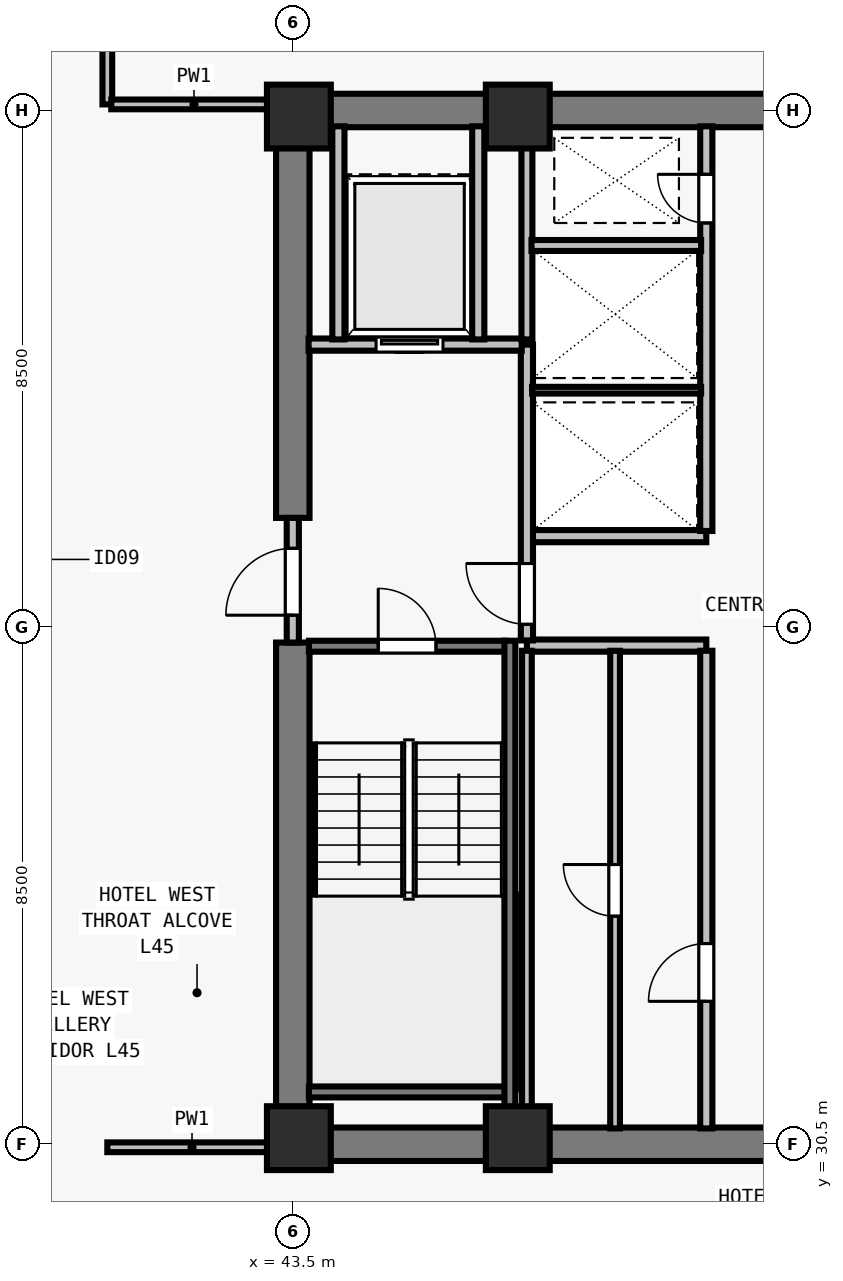
"""IFC4 building model, lengths in metres.
Left out: names, types, materials, properties, quantities, classifications, styles, units other than length and angle.
Written with IfcOpenShell. Run it as: python <this file> out.ifc"""

import sys

from ifc_helpers import new_model, si_unit, direction, frame, frame_2d, origin, origin_2d, place, context, subcontext, project, spatial, rectangle, extrude, element, fill, save


model = new_model("IFC4")
c1 = context("Model", 3, precision=1e-05, world=origin(), true_north=direction((0.0, 1.0)))
c2 = subcontext(c1, "Body", "Model", "MODEL_VIEW")
j1 = project(units=[si_unit("LENGTHUNIT", "METRE"), si_unit("PLANEANGLEUNIT", "RADIAN")], contexts=[c1])
p1 = place(None, origin())
s1 = spatial("IfcSite", under=j1, at=p1, CompositionType="ELEMENT")
p2 = place(p1, origin())
s2 = spatial("IfcBuilding", under=s1, at=p2, CompositionType="ELEMENT")
p3 = place(p2, frame((0.0, 0.0, 165.5)))
s3 = spatial("IfcBuildingStorey", under=s2, at=p3, CompositionType="ELEMENT", Elevation=165.5)
for number, where, z_axis, x_axis in (
    (1, (43.6, 30.6, 0.0), (0.0, 0.0, 1.0), (1.0, 0.0, 0.0)),
    (2, (47.2, 30.6, 0.0), (0.0, 0.0, 1.0), (1.0, 0.0, 0.0)),
    (3, (43.6, 47.4, 0.0), (0.0, 0.0, 1.0), (1.0, 0.0, 0.0)),
    (4, (47.2, 47.4, 0.0), (0.0, 0.0, 1.0), (1.0, 0.0, 0.0)),
):
    element("IfcColumn", number, at=place(p3, frame(where, z_axis=z_axis, x_axis=x_axis)), inside=s3, PredefinedType="COLUMN", context=c2, shape_type="SweptSolid", body=[
        extrude(rectangle(XDim=1.05, YDim=1.05, at=origin_2d()), origin(), (0.0, 0.0, 1.0), 3.5),
    ])
for number, where, z_axis, x_axis in (
    (5, (43.225, 30.5, 0.0), (0.0, 0.0, 1.0), (1.0, 0.0, 0.0)),
    (6, (43.225, 47.5, 0.0), (0.0, 0.0, 1.0), (1.0, 0.0, 0.0)),
):
    element("IfcWall", number, at=place(p3, frame(where, z_axis=z_axis, x_axis=x_axis)), inside=s3, PredefinedType="SHEAR", context=c2, shape_type="SweptSolid", body=[
        extrude(rectangle(XDim=17.55, YDim=0.55, at=frame_2d((8.775, 0.0))), origin(), (0.0, 0.0, 1.0), 3.28),
    ])
p4 = place(p3, frame((43.5, 30.765, 0.0), z_axis=(0.0, 0.0, 1.0), x_axis=(0.0, 1.0, 0.0)))
e7 = element("IfcWall", 7, at=p4, inside=s3, PredefinedType="SHEAR", context=c2, shape_type="SweptSolid", body=[
    extrude(rectangle(XDim=7.985, YDim=0.55, at=frame_2d((3.993, 0.0))), origin(), (0.0, 0.0, 1.0), 3.28),
])
p5 = place(p3, frame((43.5, 40.8, 0.0), z_axis=(0.0, 0.0, 1.0), x_axis=(0.0, 1.0, 0.0)))
e8 = element("IfcWall", 8, at=p5, inside=s3, PredefinedType="SHEAR", context=c2, shape_type="SweptSolid", body=[
    extrude(rectangle(XDim=6.435, YDim=0.55, at=frame_2d((3.218, 0.0))), origin(), (0.0, 0.0, 1.0), 3.28),
])
for number, where, z_axis, x_axis in (
    (9, (47.35, 38.7, 0.0), (0.0, 0.0, 1.0), (1.0, 0.0, 0.0)),
    (10, (47.35, 40.5, 0.0), (0.0, 0.0, 1.0), (1.0, 0.0, 0.0)),
):
    element("IfcWall", number, at=place(p3, frame(where, z_axis=z_axis, x_axis=x_axis)), inside=s3, PredefinedType="SOLIDWALL", context=c2, shape_type="SweptSolid", body=[
        extrude(rectangle(XDim=2.95, YDim=0.2, at=frame_2d((1.475, 0.0))), origin(), (0.0, 0.0, 1.0), 3.28),
    ])
p6 = place(p3, frame((50.3, 30.76, 0.0), z_axis=(0.0, 0.0, 1.0), x_axis=(0.0, 1.0, 0.0)))
e11 = element("IfcWall", 11, at=p6, inside=s3, PredefinedType="SOLIDWALL", context=c2, shape_type="SweptSolid", body=[
    extrude(rectangle(XDim=7.855, YDim=0.2, at=frame_2d((3.927, 0.0))), origin(), (0.0, 0.0, 1.0), 3.28),
])
p7 = place(p6, frame((2.09, 0.0, 0.0)))
e12 = element("IfcOpeningElement", 12, at=p7, cuts=e11, PredefinedType="OPENING", context=c2, shape_type="SweptSolid", body=[
    extrude(rectangle(XDim=0.95, YDim=2.12, at=frame_2d((0.475, 1.06))), frame((0.0, 0.11, 0.0), z_axis=(0.0, -1.0, 0.0), x_axis=(1.0, 0.0, 0.0)), (0.0, 0.0, 1.0), 0.22),
])
p8 = place(p3, frame((50.3, 40.585, 0.0), z_axis=(0.0, 0.0, 1.0), x_axis=(0.0, 1.0, 0.0)))
e13 = element("IfcWall", 13, at=p8, inside=s3, PredefinedType="SOLIDWALL", context=c2, shape_type="SweptSolid", body=[
    extrude(rectangle(XDim=6.655, YDim=0.2, at=frame_2d((3.328, 0.0))), origin(), (0.0, 0.0, 1.0), 3.28),
])
p9 = place(p8, frame((5.065, 0.0, 0.0)))
e14 = element("IfcOpeningElement", 14, at=p9, cuts=e13, PredefinedType="OPENING", context=c2, shape_type="SweptSolid", body=[
    extrude(rectangle(XDim=0.8, YDim=2.08, at=frame_2d((0.4, 1.04))), frame((0.0, 0.11, 0.0), z_axis=(0.0, -1.0, 0.0), x_axis=(1.0, 0.0, 0.0)), (0.0, 0.0, 1.0), 0.22),
])
p10 = place(p3, frame((43.5, 38.75, 0.0), z_axis=(0.0, 0.0, 1.0), x_axis=(0.0, 1.0, 0.0)))
e15 = element("IfcWall", 15, at=p10, inside=s3, PredefinedType="SOLIDWALL", context=c2, shape_type="SweptSolid", body=[
    extrude(rectangle(XDim=2.05, YDim=0.2, at=frame_2d((1.025, 0.0))), origin(), (0.0, 0.0, 1.0), 3.28),
])
p11 = place(p10, frame((0.45, 0.0, 0.0)))
e16 = element("IfcOpeningElement", 16, at=p11, cuts=e15, PredefinedType="OPENING", context=c2, shape_type="SweptSolid", body=[
    extrude(rectangle(XDim=1.1, YDim=2.15, at=frame_2d((0.55, 1.075))), frame((0.0, 0.11, 0.0), z_axis=(0.0, -1.0, 0.0), x_axis=(1.0, 0.0, 0.0)), (0.0, 0.0, 1.0), 0.22),
])
p12 = place(p3, frame((47.35, 38.785, 0.0), z_axis=(0.0, 0.0, 1.0), x_axis=(0.0, 1.0, 0.0)))
e17 = element("IfcWall", 17, at=p12, inside=s3, PredefinedType="SOLIDWALL", context=c2, shape_type="SweptSolid", body=[
    extrude(rectangle(XDim=4.865, YDim=0.2, at=frame_2d((2.433, 0.0))), origin(), (0.0, 0.0, 1.0), 3.28),
])
p13 = place(p12, frame((0.265, 0.0, 0.0)))
e18 = element("IfcOpeningElement", 18, at=p13, cuts=e17, PredefinedType="OPENING", context=c2, shape_type="SweptSolid", body=[
    extrude(rectangle(XDim=1.0, YDim=2.15, at=frame_2d((0.5, 1.075))), frame((0.0, 0.11, 0.0), z_axis=(0.0, -1.0, 0.0), x_axis=(1.0, 0.0, 0.0)), (0.0, 0.0, 1.0), 0.22),
])
p14 = place(p3, frame((43.76, 43.65, 0.0), z_axis=(0.0, 0.0, 1.0), x_axis=(1.0, 0.0, 0.0)))
e19 = element("IfcWall", 19, at=p14, inside=s3, PredefinedType="SOLIDWALL", context=c2, shape_type="SweptSolid", body=[
    extrude(rectangle(XDim=3.505, YDim=0.2, at=frame_2d((1.752, 0.0))), origin(), (0.0, 0.0, 1.0), 3.28),
])
p15 = place(p14, frame((1.11, 0.0, 0.0)))
e20 = element("IfcOpeningElement", 20, at=p15, cuts=e19, PredefinedType="OPENING", context=c2, shape_type="SweptSolid", body=[
    extrude(rectangle(XDim=1.1, YDim=2.2, at=frame_2d((0.55, 1.1))), frame((0.0, 0.11, 0.0), z_axis=(0.0, -1.0, 0.0), x_axis=(1.0, 0.0, 0.0)), (0.0, 0.0, 1.0), 0.22),
])
for number, where, z_axis, x_axis in (
    (21, (46.55, 43.735, 0.0), (0.0, 0.0, 1.0), (0.0, 1.0, 0.0)),
    (22, (44.25, 43.735, 0.0), (0.0, 0.0, 1.0), (0.0, 1.0, 0.0)),
):
    element("IfcWall", number, at=place(p3, frame(where, z_axis=z_axis, x_axis=x_axis)), inside=s3, PredefinedType="SOLIDWALL", context=c2, shape_type="SweptSolid", body=[
        extrude(rectangle(XDim=3.505, YDim=0.2, at=frame_2d((1.752, 0.0))), origin(), (0.0, 0.0, 1.0), 3.28),
    ])
p16 = place(p3, frame((47.35, 30.76, 0.0), z_axis=(0.0, 0.0, 1.0), x_axis=(0.0, 1.0, 0.0)))
e23 = element("IfcWall", 23, at=p16, inside=s3, PredefinedType="PARTITIONING", context=c2, shape_type="SweptSolid", body=[
    extrude(rectangle(XDim=7.855, YDim=0.16, at=frame_2d((3.927, 0.0))), origin(), (0.0, 0.0, 1.0), 3.28),
])
p17 = place(p3, frame((48.8, 30.76, 0.0), z_axis=(0.0, 0.0, 1.0), x_axis=(0.0, 1.0, 0.0)))
e24 = element("IfcWall", 24, at=p17, inside=s3, PredefinedType="PARTITIONING", context=c2, shape_type="SweptSolid", body=[
    extrude(rectangle(XDim=7.855, YDim=0.16, at=frame_2d((3.927, 0.0))), origin(), (0.0, 0.0, 1.0), 3.28),
])
p18 = place(p17, frame((3.49, 0.0, 0.0)))
e25 = element("IfcOpeningElement", 25, at=p18, cuts=e24, PredefinedType="OPENING", context=c2, shape_type="SweptSolid", body=[
    extrude(rectangle(XDim=0.85, YDim=2.12, at=frame_2d((0.425, 1.06))), frame((0.0, 0.09, 0.0), z_axis=(0.0, -1.0, 0.0), x_axis=(1.0, 0.0, 0.0)), (0.0, 0.0, 1.0), 0.18),
])
p19 = place(p3, frame((47.35, 43.735, 0.0), z_axis=(0.0, 0.0, 1.0), x_axis=(0.0, 1.0, 0.0)))
e26 = element("IfcWall", 26, at=p19, inside=s3, PredefinedType="SOLIDWALL", context=c2, shape_type="SweptSolid", body=[
    extrude(rectangle(XDim=3.505, YDim=0.18, at=frame_2d((1.752, 0.0))), origin(), (0.0, 0.0, 1.0), 3.28),
])
p20 = place(p3, frame((47.435, 42.9, 0.0), z_axis=(0.0, 0.0, 1.0), x_axis=(1.0, 0.0, 0.0)))
e27 = element("IfcWall", 27, at=p20, inside=s3, PredefinedType="PARTITIONING", context=c2, shape_type="SweptSolid", body=[
    extrude(rectangle(XDim=2.78, YDim=0.11, at=frame_2d((1.39, 0.0))), origin(), (0.0, 0.0, 1.0), 3.28),
])
p21 = place(p3, frame((47.425, 45.28, 0.0), z_axis=(0.0, 0.0, 1.0), x_axis=(1.0, 0.0, 0.0)))
e28 = element("IfcWall", 28, at=p21, inside=s3, PredefinedType="SOLIDWALL", context=c2, shape_type="SweptSolid", body=[
    extrude(rectangle(XDim=2.79, YDim=0.18, at=frame_2d((1.395, 0.0))), origin(), (0.0, 0.0, 1.0), 3.28),
])
p22 = place(p3, frame((40.45, 47.6, 0.0), z_axis=(0.0, 0.0, 1.0), x_axis=(0.0, 1.0, 0.0)))
e29 = element("IfcWall", 29, at=p22, inside=s3, PredefinedType="PARTITIONING", context=c2, shape_type="SweptSolid", body=[
    extrude(rectangle(XDim=15.075, YDim=0.16, at=frame_2d((7.538, 0.0))), origin(), (0.0, 0.0, 1.0), 2.555),
])
p23 = place(p22, frame((3.5, 0.0, 0.0)))
e30 = element("IfcOpeningElement", 30, at=p23, cuts=e29, PredefinedType="OPENING", context=c2, shape_type="SweptSolid", body=[
    extrude(rectangle(XDim=0.96, YDim=2.12, at=frame_2d((0.48, 1.06))), frame((0.0, 0.09, 0.0), z_axis=(0.0, -1.0, 0.0), x_axis=(1.0, 0.0, 0.0)), (0.0, 0.0, 1.0), 0.18),
])
p24 = place(p3, frame((40.45, 30.45, 0.0), z_axis=(0.0, 0.0, 1.0), x_axis=(1.0, 0.0, 0.0)))
e31 = element("IfcWall", 31, at=p24, inside=s3, PredefinedType="PARTITIONING", context=c2, shape_type="SweptSolid", body=[
    extrude(rectangle(XDim=2.785, YDim=0.16, at=frame_2d((1.393, 0.0))), origin(), (0.0, 0.0, 1.0), 3.28),
])
p25 = place(p3, frame((40.515, 47.6, 0.0), z_axis=(0.0, 0.0, 1.0), x_axis=(1.0, 0.0, 0.0)))
e32 = element("IfcWall", 32, at=p25, inside=s3, PredefinedType="PARTITIONING", context=c2, shape_type="SweptSolid", body=[
    extrude(rectangle(XDim=2.72, YDim=0.16, at=frame_2d((1.36, 0.0))), origin(), (0.0, 0.0, 1.0), 3.28),
])
p26 = place(p3, frame((43.765, 38.69, 0.0), z_axis=(0.0, 0.0, 1.0), x_axis=(1.0, 0.0, 0.0)))
e33 = element("IfcWall", 33, at=p26, inside=s3, PredefinedType="SOLIDWALL", context=c2, shape_type="SweptSolid", body=[
    extrude(rectangle(XDim=3.23, YDim=0.18, at=frame_2d((1.615, 0.0))), origin(), (0.0, 0.0, 1.0), 3.28),
])
p27 = place(p26, frame((1.14, 0.0, 0.0)))
e34 = element("IfcOpeningElement", 34, at=p27, cuts=e33, PredefinedType="OPENING", context=c2, shape_type="SweptSolid", body=[
    extrude(rectangle(XDim=0.95, YDim=2.15, at=frame_2d((0.475, 1.075))), frame((0.0, 0.1, 0.0), z_axis=(0.0, -1.0, 0.0), x_axis=(1.0, 0.0, 0.0)), (0.0, 0.0, 1.0), 0.2),
])
p28 = place(p3, frame((43.765, 31.36, 0.0), z_axis=(0.0, 0.0, 1.0), x_axis=(1.0, 0.0, 0.0)))
e35 = element("IfcWall", 35, at=p28, inside=s3, PredefinedType="SOLIDWALL", context=c2, shape_type="SweptSolid", body=[
    extrude(rectangle(XDim=3.23, YDim=0.18, at=frame_2d((1.615, 0.0))), origin(), (0.0, 0.0, 1.0), 3.28),
])
p29 = place(p3, frame((47.07, 38.78, 0.0), z_axis=(0.0, 0.0, 1.0), x_axis=(0.0, -1.0, 0.0)))
e36 = element("IfcWall", 36, at=p29, inside=s3, PredefinedType="SOLIDWALL", context=c2, shape_type="SweptSolid", body=[
    extrude(rectangle(XDim=8.017, YDim=0.18, at=frame_2d((4.009, 0.0))), origin(), (0.0, 0.0, 1.0), 3.28),
])
p30 = place(p11, origin())
e37 = element("IfcDoor", 37, at=p30, inside=s3, OperationType="SINGLE_SWING_LEFT", PredefinedType="DOOR", context=c2, shape_type="SweptSolid", body=[
    extrude(rectangle(XDim=1.1, YDim=2.15, at=frame_2d((0.55, 1.075))), frame((0.0, 0.025, 0.0), z_axis=(0.0, -1.0, 0.0), x_axis=(1.0, 0.0, 0.0)), (0.0, 0.0, 1.0), 0.05),
])
fill(e16, e37)
p31 = place(p13, origin())
e38 = element("IfcDoor", 38, at=p31, inside=s3, OperationType="SINGLE_SWING_RIGHT", PredefinedType="DOOR", context=c2, shape_type="SweptSolid", body=[
    extrude(rectangle(XDim=1.0, YDim=2.15, at=frame_2d((0.5, 1.075))), frame((0.0, 0.025, 0.0), z_axis=(0.0, -1.0, 0.0), x_axis=(1.0, 0.0, 0.0)), (0.0, 0.0, 1.0), 0.05),
])
fill(e18, e38)
p32 = place(p15, origin())
e39 = element("IfcDoor", 39, at=p32, inside=s3, OperationType="SLIDING_TO_LEFT", PredefinedType="DOOR", context=c2, shape_type="SweptSolid", body=[
    extrude(rectangle(XDim=1.1, YDim=2.2, at=frame_2d((0.55, 1.1))), frame((0.0, 0.025, 0.0), z_axis=(0.0, -1.0, 0.0), x_axis=(1.0, 0.0, 0.0)), (0.0, 0.0, 1.0), 0.05),
])
fill(e20, e39)
p33 = place(p7, origin())
e40 = element("IfcDoor", 40, at=p33, inside=s3, OperationType="SINGLE_SWING_LEFT", PredefinedType="DOOR", context=c2, shape_type="SweptSolid", body=[
    extrude(rectangle(XDim=0.95, YDim=2.12, at=frame_2d((0.475, 1.06))), frame((0.0, 0.025, 0.0), z_axis=(0.0, -1.0, 0.0), x_axis=(1.0, 0.0, 0.0)), (0.0, 0.0, 1.0), 0.05),
])
fill(e12, e40)
p34 = place(p18, origin())
e41 = element("IfcDoor", 41, at=p34, inside=s3, OperationType="SINGLE_SWING_RIGHT", PredefinedType="DOOR", context=c2, shape_type="SweptSolid", body=[
    extrude(rectangle(XDim=0.85, YDim=2.12, at=frame_2d((0.425, 1.06))), frame((0.0, 0.025, 0.0), z_axis=(0.0, -1.0, 0.0), x_axis=(1.0, 0.0, 0.0)), (0.0, 0.0, 1.0), 0.05),
])
fill(e25, e41)
p35 = place(p9, origin())
e42 = element("IfcDoor", 42, at=p35, inside=s3, OperationType="SINGLE_SWING_RIGHT", PredefinedType="DOOR", context=c2, shape_type="SweptSolid", body=[
    extrude(rectangle(XDim=0.8, YDim=2.08, at=frame_2d((0.4, 1.04))), frame((0.0, 0.025, 0.0), z_axis=(0.0, -1.0, 0.0), x_axis=(1.0, 0.0, 0.0)), (0.0, 0.0, 1.0), 0.05),
])
fill(e14, e42)
p36 = place(p27, origin())
e43 = element("IfcDoor", 43, at=p36, inside=s3, OperationType="SINGLE_SWING_LEFT", PredefinedType="DOOR", context=c2, shape_type="SweptSolid", body=[
    extrude(rectangle(XDim=0.95, YDim=2.15, at=frame_2d((0.475, 1.075))), frame((0.0, 0.025, 0.0), z_axis=(0.0, -1.0, 0.0), x_axis=(1.0, 0.0, 0.0)), (0.0, 0.0, 1.0), 0.05),
])
fill(e34, e43)
save(model, sys.argv[1])
